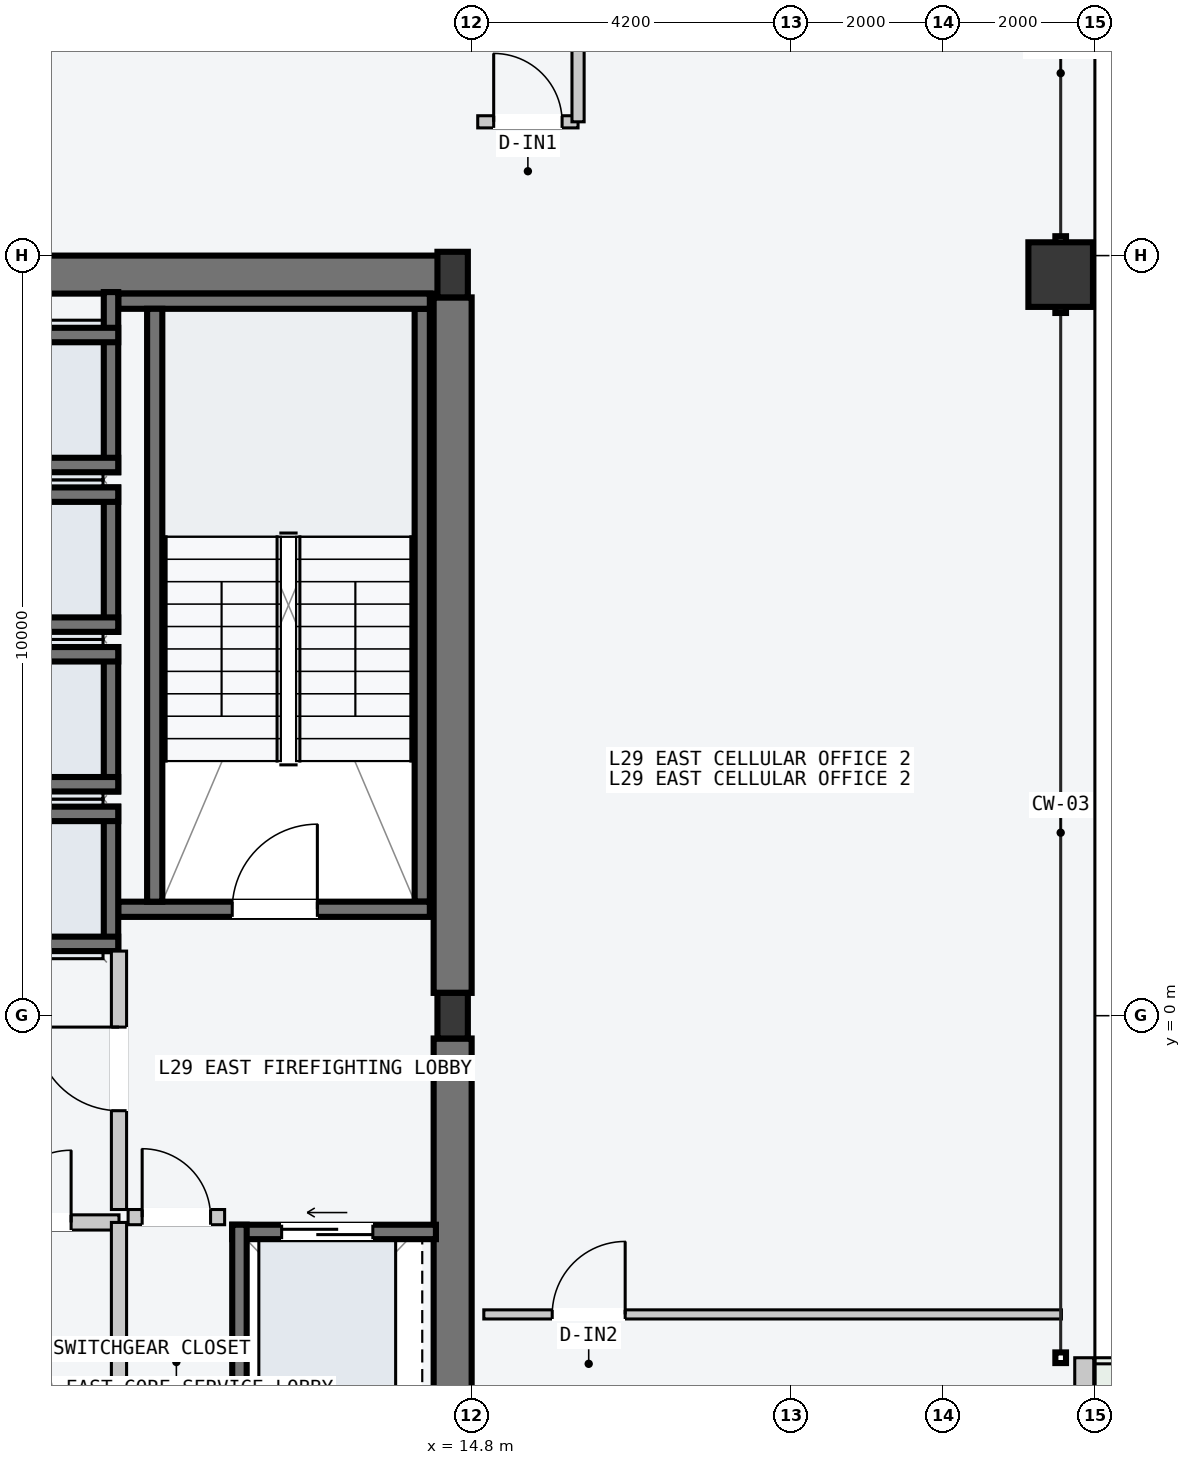
"""IFC4 building model, lengths in metres.
Left out: names, types, materials, properties, quantities, classifications, styles, units other than length and angle.
Written with IfcOpenShell. Run it as: python <this file> out.ifc"""

import sys

from ifc_helpers import new_model, si_unit, direction, frame, frame_2d, origin, origin_2d, place, context, subcontext, project, spatial, rectangle, hollow_rectangle, i_section, extrude, element, fill, save


model = new_model("IFC4")
c1 = context("Model", 3, precision=1e-05, world=origin(), true_north=direction((0.0, 1.0)))
c2 = subcontext(c1, "Body", "Model", "MODEL_VIEW")
j1 = project(units=[si_unit("LENGTHUNIT", "METRE"), si_unit("PLANEANGLEUNIT", "RADIAN")], contexts=[c1])
p1 = place(None, origin())
s1 = spatial("IfcSite", under=j1, at=p1, CompositionType="ELEMENT")
p2 = place(p1, origin())
s2 = spatial("IfcBuilding", under=s1, at=p2, CompositionType="ELEMENT")
p3 = place(p2, frame((0.0, 0.0, 113.4)))
s3 = spatial("IfcBuildingStorey", under=s2, at=p3, CompositionType="ELEMENT", Elevation=113.4)
p4 = place(p3, frame((8.07, 9.75, -0.2), z_axis=(0.0, 0.0, 1.0), x_axis=(1.0, 0.0, 0.0)))
e1 = element("IfcWall", 1, at=p4, inside=s3, PredefinedType="SHEAR", context=c2, shape_type="SweptSolid", body=[
    extrude(rectangle(XDim=6.46, YDim=0.5, at=frame_2d((3.23, 0.0))), origin(), (0.0, 0.0, 1.0), 3.6),
])
for number, where, z_axis, x_axis in (
    (2, (14.55, -9.45, -0.2), (0.0, 0.0, 1.0), (0.0, 1.0, 0.0)),
    (3, (14.55, 0.3, -0.2), (0.0, 0.0, 1.0), (0.0, 1.0, 0.0)),
):
    element("IfcWall", number, at=place(p3, frame(where, z_axis=z_axis, x_axis=x_axis)), inside=s3, PredefinedType="SHEAR", context=c2, shape_type="SweptSolid", body=[
        extrude(rectangle(XDim=9.15, YDim=0.5, at=frame_2d((4.575, 0.0))), origin(), (0.0, 0.0, 1.0), 3.6),
    ])
p5 = place(p3, frame((14.15, 1.5, -0.2), z_axis=(0.0, 0.0, 1.0), x_axis=(0.0, 1.0, 0.0)))
e4 = element("IfcWall", 4, at=p5, inside=s3, PredefinedType="SOLIDWALL", context=c2, shape_type="SweptSolid", body=[
    extrude(rectangle(XDim=7.8, YDim=0.2, at=frame_2d((3.9, 0.0))), origin(), (0.0, 0.0, 1.0), 3.6),
])
p6 = place(p3, frame((10.15, 1.4, -0.2), z_axis=(0.0, 0.0, 1.0), x_axis=(1.0, 0.0, 0.0)))
e5 = element("IfcWall", 5, at=p6, inside=s3, PredefinedType="SOLIDWALL", context=c2, shape_type="SweptSolid", body=[
    extrude(rectangle(XDim=4.1, YDim=0.2, at=frame_2d((2.05, 0.0))), origin(), (0.0, 0.0, 1.0), 3.6),
])
p7 = place(p6, frame((1.5, 0.0, 0.2)))
e6 = element("IfcOpeningElement", 6, at=p7, cuts=e5, PredefinedType="OPENING", context=c2, shape_type="SweptSolid", body=[
    extrude(rectangle(XDim=1.12, YDim=2.18, at=frame_2d((0.56, 1.09))), frame((0.0, 0.11, 0.0), z_axis=(0.0, -1.0, 0.0), x_axis=(1.0, 0.0, 0.0)), (0.0, 0.0, 1.0), 0.22),
])
p8 = place(p3, frame((10.15, 9.4, -0.2), z_axis=(0.0, 0.0, 1.0), x_axis=(1.0, 0.0, 0.0)))
e7 = element("IfcWall", 7, at=p8, inside=s3, PredefinedType="SOLIDWALL", context=c2, shape_type="SweptSolid", body=[
    extrude(rectangle(XDim=4.1, YDim=0.2, at=frame_2d((2.05, 0.0))), origin(), (0.0, 0.0, 1.0), 3.6),
])
p9 = place(p3, frame((10.63, 1.5, -0.2), z_axis=(0.0, 0.0, 1.0), x_axis=(0.0, 1.0, 0.0)))
e8 = element("IfcWall", 8, at=p9, inside=s3, PredefinedType="SOLIDWALL", context=c2, shape_type="SweptSolid", body=[
    extrude(rectangle(XDim=7.8, YDim=0.2, at=frame_2d((3.9, 0.0))), origin(), (0.0, 0.0, 1.0), 3.6),
])
for number, where, z_axis, x_axis in (
    (9, (14.55, 0.0, 0.0), (0.0, 0.0, 1.0), (1.0, 0.0, 0.0)),
    (10, (14.55, 9.75, 0.0), (0.0, 0.0, 1.0), (1.0, 0.0, 0.0)),
):
    element("IfcColumn", number, at=place(p3, frame(where, z_axis=z_axis, x_axis=x_axis)), inside=s3, PredefinedType="COLUMN", context=c2, shape_type="SweptSolid", body=[
        extrude(i_section(OverallWidth=0.4, OverallDepth=0.6, WebThickness=0.022, FlangeThickness=0.036, at=origin_2d()), origin(), (0.0, 0.0, 1.0), 3.6),
    ])
p10 = place(p3, frame((22.55, 9.75, 0.0), z_axis=(0.0, 0.0, 1.0), x_axis=(0.0, 1.0, 0.0)))
e11 = element("IfcColumn", 11, at=p10, inside=s3, PredefinedType="COLUMN", context=c2, shape_type="SweptSolid", body=[
    extrude(hollow_rectangle(XDim=0.85, YDim=0.85, WallThickness=0.04, at=origin_2d()), origin(), (0.0, 0.0, 1.0), 3.6),
])
p11 = place(p3, frame((22.86, -9.305, 0.0), z_axis=(0.0, 0.0, 1.0), x_axis=(0.0, 1.0, 0.0)))
e12 = element("IfcWall", 12, at=p11, inside=s3, PredefinedType="STANDARD", context=c2, shape_type="SweptSolid", body=[
    extrude(rectangle(XDim=4.805, YDim=0.25, at=frame_2d((2.402, 0.0))), origin(), (0.0, 0.0, 1.0), 3.4),
])
p12 = place(p11, frame((1.905, 0.0, 0.0)))
e13 = element("IfcOpeningElement", 13, at=p12, cuts=e12, PredefinedType="OPENING", context=c2, shape_type="SweptSolid", body=[
    extrude(rectangle(XDim=1.6, YDim=2.2, at=frame_2d((0.8, 1.1))), frame((0.0, 0.135, 0.0), z_axis=(0.0, -1.0, 0.0), x_axis=(1.0, 0.0, 0.0)), (0.0, 0.0, 1.0), 0.27),
])
p13 = place(p3, frame((10.055, 0.85, -0.2), z_axis=(0.0, 0.0, 1.0), x_axis=(0.0, 1.0, 0.0)))
e14 = element("IfcWall", 14, at=p13, inside=s3, PredefinedType="SOLIDWALL", context=c2, shape_type="SweptSolid", body=[
    extrude(rectangle(XDim=1.9, YDim=0.19, at=frame_2d((0.95, 0.0))), origin(), (0.0, 0.0, 1.0), 3.6),
])
for number, where, z_axis, x_axis in (
    (15, (7.95, 2.655, -0.2), (0.0, 0.0, 1.0), (1.0, 0.0, 0.0)),
    (16, (7.95, 0.945, -0.2), (0.0, 0.0, 1.0), (1.0, 0.0, 0.0)),
):
    element("IfcWall", number, at=place(p3, frame(where, z_axis=z_axis, x_axis=x_axis)), inside=s3, PredefinedType="SOLIDWALL", context=c2, shape_type="SweptSolid", body=[
        extrude(rectangle(XDim=2.2, YDim=0.19, at=frame_2d((1.1, 0.0))), origin(), (0.0, 0.0, 1.0), 3.6),
    ])
p14 = place(p3, frame((10.055, 2.95, -0.2), z_axis=(0.0, 0.0, 1.0), x_axis=(0.0, 1.0, 0.0)))
e17 = element("IfcWall", 17, at=p14, inside=s3, PredefinedType="SOLIDWALL", context=c2, shape_type="SweptSolid", body=[
    extrude(rectangle(XDim=1.9, YDim=0.19, at=frame_2d((0.95, 0.0))), origin(), (0.0, 0.0, 1.0), 3.6),
])
for number, where, z_axis, x_axis in (
    (18, (7.95, 4.755, -0.2), (0.0, 0.0, 1.0), (1.0, 0.0, 0.0)),
    (19, (7.95, 3.045, -0.2), (0.0, 0.0, 1.0), (1.0, 0.0, 0.0)),
):
    element("IfcWall", number, at=place(p3, frame(where, z_axis=z_axis, x_axis=x_axis)), inside=s3, PredefinedType="SOLIDWALL", context=c2, shape_type="SweptSolid", body=[
        extrude(rectangle(XDim=2.2, YDim=0.19, at=frame_2d((1.1, 0.0))), origin(), (0.0, 0.0, 1.0), 3.6),
    ])
p15 = place(p3, frame((10.055, 5.05, -0.2), z_axis=(0.0, 0.0, 1.0), x_axis=(0.0, 1.0, 0.0)))
e20 = element("IfcWall", 20, at=p15, inside=s3, PredefinedType="SOLIDWALL", context=c2, shape_type="SweptSolid", body=[
    extrude(rectangle(XDim=1.9, YDim=0.19, at=frame_2d((0.95, 0.0))), origin(), (0.0, 0.0, 1.0), 3.6),
])
for number, where, z_axis, x_axis in (
    (21, (7.95, 6.855, -0.2), (0.0, 0.0, 1.0), (1.0, 0.0, 0.0)),
    (22, (7.95, 5.145, -0.2), (0.0, 0.0, 1.0), (1.0, 0.0, 0.0)),
):
    element("IfcWall", number, at=place(p3, frame(where, z_axis=z_axis, x_axis=x_axis)), inside=s3, PredefinedType="SOLIDWALL", context=c2, shape_type="SweptSolid", body=[
        extrude(rectangle(XDim=2.2, YDim=0.19, at=frame_2d((1.1, 0.0))), origin(), (0.0, 0.0, 1.0), 3.6),
    ])
p16 = place(p3, frame((10.055, 7.15, -0.2), z_axis=(0.0, 0.0, 1.0), x_axis=(0.0, 1.0, 0.0)))
e23 = element("IfcWall", 23, at=p16, inside=s3, PredefinedType="SOLIDWALL", context=c2, shape_type="SweptSolid", body=[
    extrude(rectangle(XDim=2.37, YDim=0.19, at=frame_2d((1.185, 0.0))), origin(), (0.0, 0.0, 1.0), 3.6),
])
for number, where, z_axis, x_axis in (
    (24, (7.95, 8.955, -0.2), (0.0, 0.0, 1.0), (1.0, 0.0, 0.0)),
    (25, (7.95, 7.245, -0.2), (0.0, 0.0, 1.0), (1.0, 0.0, 0.0)),
):
    element("IfcWall", number, at=place(p3, frame(where, z_axis=z_axis, x_axis=x_axis)), inside=s3, PredefinedType="SOLIDWALL", context=c2, shape_type="SweptSolid", body=[
        extrude(rectangle(XDim=2.2, YDim=0.19, at=frame_2d((1.1, 0.0))), origin(), (0.0, 0.0, 1.0), 3.6),
    ])
p17 = place(p3, frame((11.65, -2.845, -0.2), z_axis=(0.0, 0.0, 1.0), x_axis=(1.0, 0.0, 0.0)))
e26 = element("IfcWall", 26, at=p17, inside=s3, PredefinedType="SOLIDWALL", context=c2, shape_type="SweptSolid", body=[
    extrude(rectangle(XDim=2.68, YDim=0.19, at=frame_2d((1.34, 0.0))), origin(), (0.0, 0.0, 1.0), 3.6),
])
p18 = place(p17, frame((0.65, 0.0, 0.2)))
e27 = element("IfcOpeningElement", 27, at=p18, cuts=e26, PredefinedType="OPENING", context=c2, shape_type="SweptSolid", body=[
    extrude(rectangle(XDim=1.2, YDim=2.2, at=frame_2d((0.6, 1.1))), frame((0.0, 0.105, 0.0), z_axis=(0.0, -1.0, 0.0), x_axis=(1.0, 0.0, 0.0)), (0.0, 0.0, 1.0), 0.21),
])
p19 = place(p3, frame((11.745, -5.35, -0.2), z_axis=(0.0, 0.0, 1.0), x_axis=(0.0, 1.0, 0.0)))
e28 = element("IfcWall", 28, at=p19, inside=s3, PredefinedType="SOLIDWALL", context=c2, shape_type="SweptSolid", body=[
    extrude(rectangle(XDim=2.6, YDim=0.19, at=frame_2d((1.3, 0.0))), origin(), (0.0, 0.0, 1.0), 3.6),
])
p20 = place(p3, frame((10.16, -2.55, 0.0), z_axis=(0.0, 0.0, 1.0), x_axis=(0.0, 1.0, 0.0)))
e29 = element("IfcWall", 29, at=p20, inside=s3, PredefinedType="PARTITIONING", context=c2, shape_type="SweptSolid", body=[
    extrude(rectangle(XDim=3.4, YDim=0.2, at=frame_2d((1.7, 0.0))), origin(), (0.0, 0.0, 1.0), 3.4),
])
p21 = place(p20, frame((1.3, 0.0, 0.0)))
e30 = element("IfcOpeningElement", 30, at=p21, cuts=e29, PredefinedType="OPENING", context=c2, shape_type="SweptSolid", body=[
    extrude(rectangle(XDim=1.1, YDim=2.15, at=frame_2d((0.55, 1.075))), frame((0.0, 0.11, 0.0), z_axis=(0.0, -1.0, 0.0), x_axis=(1.0, 0.0, 0.0)), (0.0, 0.0, 1.0), 0.22),
])
p22 = place(p3, frame((10.28, -2.65, 0.0), z_axis=(0.0, 0.0, 1.0), x_axis=(1.0, 0.0, 0.0)))
e31 = element("IfcWall", 31, at=p22, inside=s3, PredefinedType="PARTITIONING", context=c2, shape_type="SweptSolid", body=[
    extrude(rectangle(XDim=1.27, YDim=0.2, at=frame_2d((0.635, 0.0))), origin(), (0.0, 0.0, 1.0), 3.4),
])
p23 = place(p22, frame((0.185, 0.0, 0.0)))
e32 = element("IfcOpeningElement", 32, at=p23, cuts=e31, PredefinedType="OPENING", context=c2, shape_type="SweptSolid", body=[
    extrude(rectangle(XDim=0.9, YDim=2.15, at=frame_2d((0.45, 1.075))), frame((0.0, 0.11, 0.0), z_axis=(0.0, -1.0, 0.0), x_axis=(1.0, 0.0, 0.0)), (0.0, 0.0, 1.0), 0.22),
])
p24 = place(p3, frame((7.96, -2.72, 0.0), z_axis=(0.0, 0.0, 1.0), x_axis=(1.0, 0.0, 0.0)))
e33 = element("IfcWall", 33, at=p24, inside=s3, PredefinedType="PARTITIONING", context=c2, shape_type="SweptSolid", body=[
    extrude(rectangle(XDim=2.2, YDim=0.2, at=frame_2d((1.1, 0.0))), origin(), (0.0, 0.0, 1.0), 3.4),
])
p25 = place(p24, frame((0.62, 0.0, 0.0)))
e34 = element("IfcOpeningElement", 34, at=p25, cuts=e33, PredefinedType="OPENING", context=c2, shape_type="SweptSolid", body=[
    extrude(rectangle(XDim=0.95, YDim=2.1, at=frame_2d((0.475, 1.05))), frame((0.0, 0.11, 0.0), z_axis=(0.0, -1.0, 0.0), x_axis=(1.0, 0.0, 0.0)), (0.0, 0.0, 1.0), 0.22),
])
p26 = place(p3, frame((10.16, -5.16, 0.0), z_axis=(0.0, 0.0, 1.0), x_axis=(0.0, 1.0, 0.0)))
e35 = element("IfcWall", 35, at=p26, inside=s3, PredefinedType="PARTITIONING", context=c2, shape_type="SweptSolid", body=[
    extrude(rectangle(XDim=2.44, YDim=0.2, at=frame_2d((1.22, 0.0))), origin(), (0.0, 0.0, 1.0), 3.4),
])
p27 = place(p3, frame((14.88, 11.76, 0.0), z_axis=(0.0, 0.0, 1.0), x_axis=(1.0, 0.0, 0.0)))
e36 = element("IfcWall", 36, at=p27, inside=s3, PredefinedType="PARTITIONING", context=c2, shape_type="SweptSolid", body=[
    extrude(rectangle(XDim=1.32, YDim=0.16, at=frame_2d((0.66, 0.0))), origin(), (0.0, 0.0, 1.0), 3.4),
])
p28 = place(p27, frame((0.21, 0.0, 0.0)))
e37 = element("IfcOpeningElement", 37, at=p28, cuts=e36, PredefinedType="OPENING", context=c2, shape_type="SweptSolid", body=[
    extrude(rectangle(XDim=0.9, YDim=2.15, at=frame_2d((0.45, 1.075))), frame((0.0, 0.09, 0.0), z_axis=(0.0, -1.0, 0.0), x_axis=(1.0, 0.0, 0.0)), (0.0, 0.0, 1.0), 0.18),
])
p29 = place(p3, frame((16.2, 11.76, 0.0), z_axis=(0.0, 0.0, 1.0), x_axis=(0.0, 1.0, 0.0)))
e38 = element("IfcWall", 38, at=p29, inside=s3, PredefinedType="PARTITIONING", context=c2, shape_type="SweptSolid", body=[
    extrude(rectangle(XDim=1.95, YDim=0.16, at=frame_2d((0.975, 0.0))), origin(), (0.0, 0.0, 1.0), 3.4),
])
p30 = place(p3, frame((14.96, -3.93, 0.0), z_axis=(0.0, 0.0, 1.0), x_axis=(1.0, 0.0, 0.0)))
e39 = element("IfcWall", 39, at=p30, inside=s3, PredefinedType="PARTITIONING", context=c2, shape_type="SweptSolid", body=[
    extrude(rectangle(XDim=7.6, YDim=0.12, at=frame_2d((3.8, 0.0))), origin(), (0.0, 0.0, 1.0), 3.4),
])
p31 = place(p30, frame((0.9, 0.0, 0.0)))
e40 = element("IfcOpeningElement", 40, at=p31, cuts=e39, PredefinedType="OPENING", context=c2, shape_type="SweptSolid", body=[
    extrude(rectangle(XDim=0.96, YDim=2.18, at=frame_2d((0.48, 1.09))), frame((0.0, 0.07, 0.0), z_axis=(0.0, -1.0, 0.0), x_axis=(1.0, 0.0, 0.0)), (0.0, 0.0, 1.0), 0.14),
])
p32 = place(p7, origin())
e41 = element("IfcDoor", 41, at=p32, inside=s3, OperationType="SINGLE_SWING_RIGHT", PredefinedType="DOOR", context=c2, shape_type="SweptSolid", body=[
    extrude(rectangle(XDim=1.12, YDim=2.18, at=frame_2d((0.56, 1.09))), frame((0.0, 0.025, 0.0), z_axis=(0.0, -1.0, 0.0), x_axis=(1.0, 0.0, 0.0)), (0.0, 0.0, 1.0), 0.05),
])
fill(e6, e41)
p33 = place(p18, origin())
e42 = element("IfcDoor", 42, at=p33, inside=s3, OperationType="SLIDING_TO_LEFT", PredefinedType="DOOR", context=c2, shape_type="SweptSolid", body=[
    extrude(rectangle(XDim=1.2, YDim=2.2, at=frame_2d((0.6, 1.1))), frame((0.0, 0.025, 0.0), z_axis=(0.0, -1.0, 0.0), x_axis=(1.0, 0.0, 0.0)), (0.0, 0.0, 1.0), 0.05),
])
fill(e27, e42)
p34 = place(p21, origin())
e43 = element("IfcDoor", 43, at=p34, inside=s3, OperationType="SINGLE_SWING_RIGHT", PredefinedType="DOOR", context=c2, shape_type="SweptSolid", body=[
    extrude(rectangle(XDim=1.1, YDim=2.15, at=frame_2d((0.55, 1.075))), frame((0.0, 0.025, 0.0), z_axis=(0.0, -1.0, 0.0), x_axis=(1.0, 0.0, 0.0)), (0.0, 0.0, 1.0), 0.05),
])
fill(e30, e43)
p35 = place(p23, origin())
e44 = element("IfcDoor", 44, at=p35, inside=s3, OperationType="SINGLE_SWING_LEFT", PredefinedType="DOOR", context=c2, shape_type="SweptSolid", body=[
    extrude(rectangle(XDim=0.9, YDim=2.15, at=frame_2d((0.45, 1.075))), frame((0.0, 0.025, 0.0), z_axis=(0.0, -1.0, 0.0), x_axis=(1.0, 0.0, 0.0)), (0.0, 0.0, 1.0), 0.05),
])
fill(e32, e44)
p36 = place(p25, origin())
e45 = element("IfcDoor", 45, at=p36, inside=s3, OperationType="SINGLE_SWING_RIGHT", PredefinedType="DOOR", context=c2, shape_type="SweptSolid", body=[
    extrude(rectangle(XDim=0.95, YDim=2.1, at=frame_2d((0.475, 1.05))), frame((0.0, 0.025, 0.0), z_axis=(0.0, -1.0, 0.0), x_axis=(1.0, 0.0, 0.0)), (0.0, 0.0, 1.0), 0.05),
])
fill(e34, e45)
p37 = place(p28, origin())
e46 = element("IfcDoor", 46, at=p37, inside=s3, OperationType="SINGLE_SWING_LEFT", PredefinedType="DOOR", context=c2, shape_type="SweptSolid", body=[
    extrude(rectangle(XDim=0.9, YDim=2.15, at=frame_2d((0.45, 1.075))), frame((0.0, 0.025, 0.0), z_axis=(0.0, -1.0, 0.0), x_axis=(1.0, 0.0, 0.0)), (0.0, 0.0, 1.0), 0.05),
])
fill(e37, e46)
p38 = place(p31, origin())
e47 = element("IfcDoor", 47, at=p38, inside=s3, OperationType="SINGLE_SWING_RIGHT", PredefinedType="DOOR", context=c2, shape_type="SweptSolid", body=[
    extrude(rectangle(XDim=0.96, YDim=2.18, at=frame_2d((0.48, 1.09))), frame((0.0, 0.025, 0.0), z_axis=(0.0, -1.0, 0.0), x_axis=(1.0, 0.0, 0.0)), (0.0, 0.0, 1.0), 0.05),
])
fill(e40, e47)
save(model, sys.argv[1])
